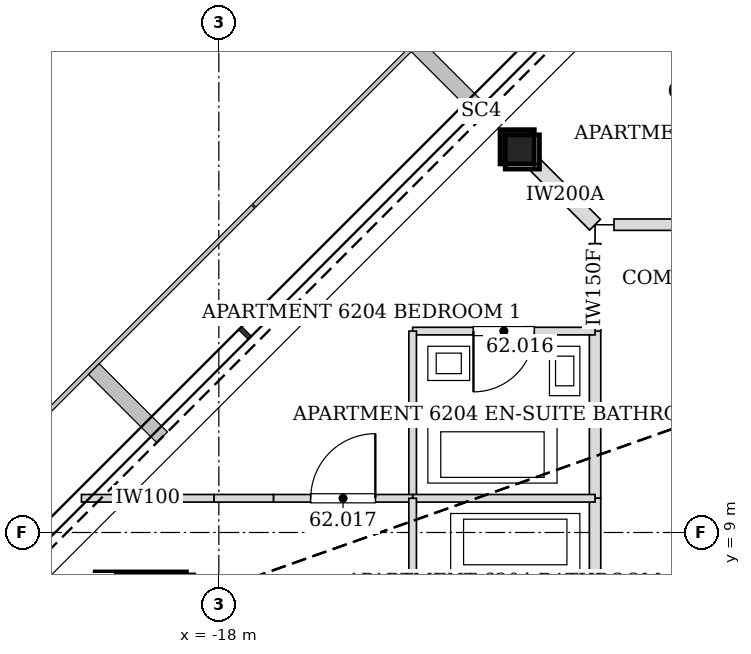
"""IFC4 building model, lengths in metres.
Left out: names, types, materials, properties, quantities, classifications, styles, units other than length and angle.
Written with IfcOpenShell. Run it as: python <this file> out.ifc"""

import sys

from ifc_helpers import new_model, si_unit, direction, frame, frame_2d, origin, origin_2d, place, context, subcontext, project, spatial, rectangle, hollow_rectangle, extrude, element, fill, save


model = new_model("IFC4")
c1 = context("Model", 3, precision=1e-05, world=origin(), true_north=direction((0.0, 1.0)))
c2 = subcontext(c1, "Body", "Model", "MODEL_VIEW")
j1 = project(units=[si_unit("LENGTHUNIT", "METRE"), si_unit("PLANEANGLEUNIT", "RADIAN")], contexts=[c1])
p1 = place(None, origin())
s1 = spatial("IfcSite", under=j1, at=p1, CompositionType="ELEMENT")
p2 = place(p1, origin())
s2 = spatial("IfcBuilding", under=s1, at=p2, CompositionType="ELEMENT")
p3 = place(p2, frame((0.0, 0.0, 258.4)))
s3 = spatial("IfcBuildingStorey", under=s2, at=p3, CompositionType="ELEMENT", Elevation=258.4)
p4 = place(p3, frame((-19.027, 7.881, 0.0), z_axis=(0.028277121884, -0.011698403216, 0.999531666202), x_axis=(0.382282742426, 0.924045401938, 0.0)))
e1 = element("IfcColumn", 1, at=p4, inside=s3, PredefinedType="COLUMN", context=c2, shape_type="SweptSolid", body=[
    extrude(hollow_rectangle(XDim=1.2, YDim=1.2, WallThickness=0.055, at=origin_2d()), origin(), (0.0, 0.0, 1.0), 3.402),
])
p5 = place(p3, frame((-14.075, 14.075, 0.0), z_axis=(0.020024994503, -0.020024994503, 0.999598919162), x_axis=(0.707106781187, 0.707106781187, 0.0)))
e2 = element("IfcColumn", 2, at=p5, inside=s3, PredefinedType="COLUMN", context=c2, shape_type="SweptSolid", body=[
    extrude(hollow_rectangle(XDim=0.45, YDim=0.45, WallThickness=0.02, at=origin_2d()), origin(), (0.0, 0.0, 1.0), 3.402),
])
p6 = place(p3, frame((-11.649, 13.05, 0.0), z_axis=(0.0, 0.0, 1.0), x_axis=(-1.0, 0.0, 0.0)))
e3 = element("IfcWall", 3, at=p6, inside=s3, PredefinedType="PARTITIONING", context=c2, shape_type="SweptSolid", body=[
    extrude(rectangle(XDim=1.152, YDim=0.15, at=frame_2d((0.576, 0.0))), origin(), (0.0, 0.0, 1.0), 2.538),
])
p7 = place(p3, frame((-13.05, 11.651, 0.0), z_axis=(0.0, 0.0, 1.0), x_axis=(0.0, -1.0, 0.0)))
e4 = element("IfcWall", 4, at=p7, inside=s3, PredefinedType="PARTITIONING", context=c2, shape_type="SweptSolid", body=[
    extrude(rectangle(XDim=2.202, YDim=0.15, at=frame_2d((1.101, 0.0))), origin(), (0.0, 0.0, 1.0), 2.34),
])
p8 = place(p3, frame((-13.05, 12.801, 0.0), z_axis=(0.0, 0.0, 1.0), x_axis=(0.0, -1.0, 0.0)))
e5 = element("IfcWall", 5, at=p8, inside=s3, PredefinedType="PARTITIONING", context=c2, shape_type="SweptSolid", body=[
    extrude(rectangle(XDim=1.152, YDim=0.15, at=frame_2d((0.576, 0.0))), origin(), (0.0, 0.0, 1.0), 2.538),
])
p9 = place(p3, frame((-13.05, 9.451, 0.0), z_axis=(0.0, 0.0, 1.0), x_axis=(0.0, -1.0, 0.0)))
e6 = element("IfcWall", 6, at=p9, inside=s3, PredefinedType="PARTITIONING", context=c2, shape_type="SweptSolid", body=[
    extrude(rectangle(XDim=2.202, YDim=0.15, at=frame_2d((1.101, 0.0))), origin(), (0.0, 0.0, 1.0), 3.15),
])
p10 = place(p3, frame((-13.834, 13.834, 0.0), z_axis=(0.0, 0.0, 1.0), x_axis=(0.707106781187, -0.707106781187, 0.0)))
e7 = element("IfcWall", 7, at=p10, inside=s3, PredefinedType="PARTITIONING", context=c2, shape_type="SweptSolid", body=[
    extrude(rectangle(XDim=1.109, YDim=0.2, at=frame_2d((0.554, 0.0))), origin(), (0.0, 0.0, 1.0), 2.23),
])
p11 = place(p3, frame((-13.05, 11.65, 0.0), z_axis=(0.0, 0.0, 1.0), x_axis=(-1.0, 0.0, 0.0)))
e8 = element("IfcWall", 8, at=p11, inside=s3, PredefinedType="PARTITIONING", context=c2, shape_type="SweptSolid", body=[
    extrude(rectangle(XDim=2.4, YDim=0.1, at=frame_2d((1.2, 0.0))), origin(), (0.0, 0.0, 1.0), 2.538),
])
p12 = place(p11, frame((0.8, 0.0, 0.0)))
e9 = element("IfcOpeningElement", 9, at=p12, cuts=e8, PredefinedType="OPENING", context=c2, shape_type="SweptSolid", body=[
    extrude(rectangle(XDim=0.8, YDim=2.1, at=frame_2d((0.4, 1.05))), frame((0.0, 0.06, 0.0), z_axis=(0.0, -1.0, 0.0), x_axis=(1.0, 0.0, 0.0)), (0.0, 0.0, 1.0), 0.12),
])
p13 = place(p3, frame((-15.45, 11.65, 0.0), z_axis=(0.0, 0.0, 1.0), x_axis=(0.0, -1.0, 0.0)))
e10 = element("IfcWall", 10, at=p13, inside=s3, PredefinedType="PARTITIONING", context=c2, shape_type="SweptSolid", body=[
    extrude(rectangle(XDim=2.2, YDim=0.1, at=frame_2d((1.1, 0.0))), origin(), (0.0, 0.0, 1.0), 2.538),
])
p14 = place(p3, frame((-15.45, 9.45, 0.0), z_axis=(0.0, 0.0, 1.0), x_axis=(1.0, 0.0, 0.0)))
e11 = element("IfcWall", 11, at=p14, inside=s3, PredefinedType="PARTITIONING", context=c2, shape_type="SweptSolid", body=[
    extrude(rectangle(XDim=2.4, YDim=0.1, at=frame_2d((1.2, 0.0))), origin(), (0.0, 0.0, 1.0), 2.34),
])
p15 = place(p3, frame((-19.807, 9.45, 0.0), z_axis=(0.0, 0.0, 1.0), x_axis=(1.0, 0.0, 0.0)))
e12 = element("IfcWall", 12, at=p15, inside=s3, PredefinedType="PARTITIONING", context=c2, shape_type="SweptSolid", body=[
    extrude(rectangle(XDim=1.745, YDim=0.1, at=frame_2d((0.873, 0.0))), origin(), (0.0, 0.0, 1.0), 3.15),
])
p16 = place(p3, frame((-17.281, 9.45, 0.0), z_axis=(0.0, 0.0, 1.0), x_axis=(1.0, 0.0, 0.0)))
e13 = element("IfcWall", 13, at=p16, inside=s3, PredefinedType="PARTITIONING", context=c2, shape_type="SweptSolid", body=[
    extrude(rectangle(XDim=1.832, YDim=0.1, at=frame_2d((0.916, 0.0))), origin(), (0.0, 0.0, 1.0), 2.538),
])
p17 = place(p16, frame((0.491, 0.0, 0.0)))
e14 = element("IfcOpeningElement", 14, at=p17, cuts=e13, PredefinedType="OPENING", context=c2, shape_type="SweptSolid", body=[
    extrude(rectangle(XDim=0.85, YDim=2.1, at=frame_2d((0.425, 1.05))), frame((0.0, 0.06, 0.0), z_axis=(0.0, -1.0, 0.0), x_axis=(1.0, 0.0, 0.0)), (0.0, 0.0, 1.0), 0.12),
])
p18 = place(p3, frame((-18.062, 9.45, 0.0), z_axis=(0.0, 0.0, 1.0), x_axis=(1.0, 0.0, 0.0)))
e15 = element("IfcWall", 15, at=p18, inside=s3, PredefinedType="PARTITIONING", context=c2, shape_type="SweptSolid", body=[
    extrude(rectangle(XDim=0.781, YDim=0.1, at=frame_2d((0.39, 0.0))), origin(), (0.0, 0.0, 1.0), 2.23),
])
p19 = place(p3, frame((-15.45, 9.45, 0.0), z_axis=(0.0, 0.0, 1.0), x_axis=(0.0, -1.0, 0.0)))
e16 = element("IfcWall", 16, at=p19, inside=s3, PredefinedType="PARTITIONING", context=c2, shape_type="SweptSolid", body=[
    extrude(rectangle(XDim=2.2, YDim=0.1, at=frame_2d((1.1, 0.0))), origin(), (0.0, 0.0, 1.0), 2.34),
])
p20 = place(p12, origin())
e17 = element("IfcDoor", 17, at=p20, inside=s3, OperationType="SINGLE_SWING_RIGHT", PredefinedType="DOOR", context=c2, shape_type="SweptSolid", body=[
    extrude(rectangle(XDim=0.8, YDim=2.1, at=frame_2d((0.4, 1.05))), frame((0.0, 0.025, 0.0), z_axis=(0.0, -1.0, 0.0), x_axis=(1.0, 0.0, 0.0)), (0.0, 0.0, 1.0), 0.05),
])
fill(e9, e17)
p21 = place(p17, origin())
e18 = element("IfcDoor", 18, at=p21, inside=s3, OperationType="SINGLE_SWING_RIGHT", PredefinedType="DOOR", context=c2, shape_type="SweptSolid", body=[
    extrude(rectangle(XDim=0.85, YDim=2.1, at=frame_2d((0.425, 1.05))), frame((0.0, 0.025, 0.0), z_axis=(0.0, -1.0, 0.0), x_axis=(1.0, 0.0, 0.0)), (0.0, 0.0, 1.0), 0.05),
])
fill(e14, e18)
save(model, sys.argv[1])
